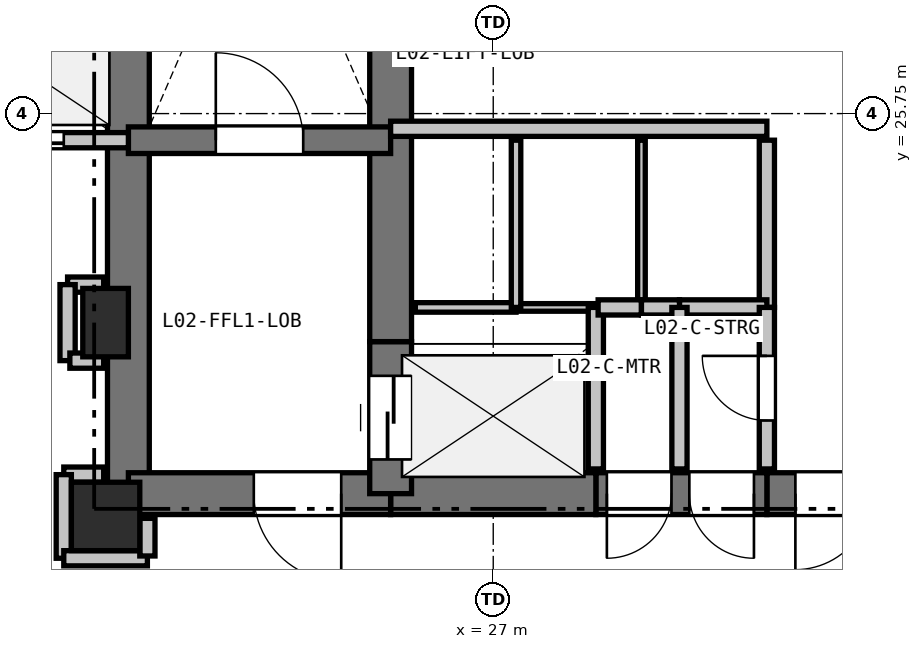
"""IFC4 building model, lengths in metres.
Left out: names, types, materials, properties, quantities, classifications, styles, units other than length and angle.
Written with IfcOpenShell. Run it as: python <this file> out.ifc"""

import sys

from ifc_helpers import new_model, si_unit, direction, frame, frame_2d, origin, origin_2d, place, context, subcontext, project, spatial, rectangle, extrude, element, fill, save


model = new_model("IFC4")
c1 = context("Model", 3, precision=1e-05, world=origin(), true_north=direction((0.0, 1.0)))
c2 = subcontext(c1, "Body", "Model", "MODEL_VIEW")
j1 = project(units=[si_unit("LENGTHUNIT", "METRE"), si_unit("PLANEANGLEUNIT", "RADIAN")], contexts=[c1])
p1 = place(None, origin())
s1 = spatial("IfcSite", under=j1, at=p1, CompositionType="ELEMENT")
p2 = place(p1, origin())
s2 = spatial("IfcBuilding", under=s1, at=p2, CompositionType="ELEMENT")
p3 = place(p2, frame((0.0, 0.0, 9.6)))
s3 = spatial("IfcBuildingStorey", under=s2, at=p3, CompositionType="ELEMENT", Elevation=9.6)
p4 = place(p3, frame((21.9, 20.45, 0.0), z_axis=(0.0, 0.0, 1.0), x_axis=(1.0, 0.0, 0.0)))
e1 = element("IfcColumn", 1, at=p4, inside=s3, PredefinedType="COLUMN", context=c2, shape_type="SweptSolid", body=[
    extrude(rectangle(XDim=0.9, YDim=0.9, at=origin_2d()), origin(), (0.0, 0.0, 1.0), 4.8),
])
p5 = place(p3, frame((21.9, 23.0, 0.0), z_axis=(0.0, 0.0, 1.0), x_axis=(1.0, 0.0, 0.0)))
e2 = element("IfcColumn", 2, at=p5, inside=s3, PredefinedType="PILASTER", context=c2, shape_type="SweptSolid", body=[
    extrude(rectangle(XDim=0.6, YDim=0.9, at=origin_2d()), origin(), (0.0, 0.0, 1.0), 4.8),
])
p6 = place(p3, frame((22.2, 20.75, 0.0), z_axis=(0.0, 0.0, 1.0), x_axis=(0.0, 1.0, 0.0)))
e3 = element("IfcWall", 3, at=p6, inside=s3, PredefinedType="SHEAR", context=c2, shape_type="SweptSolid", body=[
    extrude(rectangle(XDim=4.65, YDim=0.55, at=frame_2d((2.325, 0.0))), origin(), (0.0, 0.0, 1.0), 4.48),
])
p7 = place(p3, frame((22.2, 25.4, 0.0), z_axis=(0.0, 0.0, 1.0), x_axis=(0.0, 1.0, 0.0)))
e4 = element("IfcWall", 4, at=p7, inside=s3, PredefinedType="SHEAR", context=c2, shape_type="SweptSolid", body=[
    extrude(rectangle(XDim=7.35, YDim=0.55, at=frame_2d((3.675, 0.0))), origin(), (0.0, 0.0, 1.0), 4.48),
])
p8 = place(p3, frame((32.35, 20.75, 0.0), z_axis=(0.0, 0.0, 1.0), x_axis=(-1.0, 0.0, 0.0)))
e5 = element("IfcWall", 5, at=p8, inside=s3, PredefinedType="SHEAR", context=c2, shape_type="SweptSolid", body=[
    extrude(rectangle(XDim=1.75, YDim=0.55, at=frame_2d((0.875, 0.0))), origin(), (0.0, 0.0, 1.0), 4.48),
])
p9 = place(p8, frame((0.375, 0.0, 0.0)))
e6 = element("IfcOpeningElement", 6, at=p9, cuts=e5, PredefinedType="OPENING", context=c2, shape_type="SweptSolid", body=[
    extrude(rectangle(XDim=1.0, YDim=2.15, at=frame_2d((0.5, 1.075))), frame((0.0, 0.285, 0.0), z_axis=(0.0, -1.0, 0.0), x_axis=(1.0, 0.0, 0.0)), (0.0, 0.0, 1.0), 0.57),
])
p10 = place(p3, frame((30.6, 20.75, 0.0), z_axis=(0.0, 0.0, 1.0), x_axis=(-1.0, 0.0, 0.0)))
e7 = element("IfcWall", 7, at=p10, inside=s3, PredefinedType="SHEAR", context=c2, shape_type="SweptSolid", body=[
    extrude(rectangle(XDim=2.25, YDim=0.55, at=frame_2d((1.125, 0.0))), origin(), (0.0, 0.0, 1.0), 4.48),
])
p11 = place(p10, frame((1.255, 0.0, 0.0)))
e8 = element("IfcOpeningElement", 8, at=p11, cuts=e7, PredefinedType="OPENING", context=c2, shape_type="SweptSolid", body=[
    extrude(rectangle(XDim=0.85, YDim=2.1, at=frame_2d((0.425, 1.05))), frame((0.0, 0.285, 0.0), z_axis=(0.0, -1.0, 0.0), x_axis=(1.0, 0.0, 0.0)), (0.0, 0.0, 1.0), 0.57),
])
p12 = place(p10, frame((0.17, 0.0, 0.0)))
e9 = element("IfcOpeningElement", 9, at=p12, cuts=e7, PredefinedType="OPENING", context=c2, shape_type="SweptSolid", body=[
    extrude(rectangle(XDim=0.85, YDim=2.1, at=frame_2d((0.425, 1.05))), frame((0.0, 0.285, 0.0), z_axis=(0.0, -1.0, 0.0), x_axis=(1.0, 0.0, 0.0)), (0.0, 0.0, 1.0), 0.57),
])
p13 = place(p3, frame((28.35, 20.75, 0.0), z_axis=(0.0, 0.0, 1.0), x_axis=(-1.0, 0.0, 0.0)))
e10 = element("IfcWall", 10, at=p13, inside=s3, PredefinedType="SHEAR", context=c2, shape_type="SweptSolid", body=[
    extrude(rectangle(XDim=2.7, YDim=0.55, at=frame_2d((1.35, 0.0))), origin(), (0.0, 0.0, 1.0), 4.48),
])
p14 = place(p3, frame((25.65, 20.75, 0.0), z_axis=(0.0, 0.0, 1.0), x_axis=(-1.0, 0.0, 0.0)))
e11 = element("IfcWall", 11, at=p14, inside=s3, PredefinedType="SHEAR", context=c2, shape_type="SweptSolid", body=[
    extrude(rectangle(XDim=3.45, YDim=0.55, at=frame_2d((1.725, 0.0))), origin(), (0.0, 0.0, 1.0), 4.48),
])
p15 = place(p14, frame((0.65, 0.0, 0.0)))
e12 = element("IfcOpeningElement", 12, at=p15, cuts=e11, PredefinedType="OPENING", context=c2, shape_type="SweptSolid", body=[
    extrude(rectangle(XDim=1.15, YDim=2.15, at=frame_2d((0.575, 1.075))), frame((0.0, 0.285, 0.0), z_axis=(0.0, -1.0, 0.0), x_axis=(1.0, 0.0, 0.0)), (0.0, 0.0, 1.0), 0.57),
])
p16 = place(p3, frame((25.65, 20.75, 0.0), z_axis=(0.0, 0.0, 1.0), x_axis=(0.0, 1.0, 0.0)))
e13 = element("IfcWall", 13, at=p16, inside=s3, PredefinedType="SHEAR", context=c2, shape_type="SweptSolid", body=[
    extrude(rectangle(XDim=2.0, YDim=0.55, at=frame_2d((1.0, 0.0))), origin(), (0.0, 0.0, 1.0), 4.48),
])
p17 = place(p16, frame((0.45, 0.0, 0.0)))
e14 = element("IfcOpeningElement", 14, at=p17, cuts=e13, PredefinedType="OPENING", context=c2, shape_type="SweptSolid", body=[
    extrude(rectangle(XDim=1.1, YDim=2.15, at=frame_2d((0.55, 1.075))), frame((0.0, 0.285, 0.0), z_axis=(0.0, -1.0, 0.0), x_axis=(1.0, 0.0, 0.0)), (0.0, 0.0, 1.0), 0.57),
])
p18 = place(p3, frame((25.65, 22.75, 0.0), z_axis=(0.0, 0.0, 1.0), x_axis=(0.0, 1.0, 0.0)))
e15 = element("IfcWall", 15, at=p18, inside=s3, PredefinedType="SHEAR", context=c2, shape_type="SweptSolid", body=[
    extrude(rectangle(XDim=2.8, YDim=0.55, at=frame_2d((1.4, 0.0))), origin(), (0.0, 0.0, 1.0), 4.48),
])
p19 = place(p3, frame((25.65, 25.55, 0.0), z_axis=(0.0, 0.0, 1.0), x_axis=(0.0, 1.0, 0.0)))
e16 = element("IfcWall", 16, at=p19, inside=s3, PredefinedType="SHEAR", context=c2, shape_type="SweptSolid", body=[
    extrude(rectangle(XDim=2.4, YDim=0.55, at=frame_2d((1.2, 0.0))), origin(), (0.0, 0.0, 1.0), 4.48),
])
p20 = place(p3, frame((22.2, 25.4, 0.0), z_axis=(0.0, 0.0, 1.0), x_axis=(1.0, 0.0, 0.0)))
e17 = element("IfcWall", 17, at=p20, inside=s3, PredefinedType="SHEAR", context=c2, shape_type="SweptSolid", body=[
    extrude(rectangle(XDim=3.45, YDim=0.35, at=frame_2d((1.725, 0.0))), origin(), (0.0, 0.0, 1.0), 4.48),
])
p21 = place(p20, frame((1.15, 0.0, 0.0)))
e18 = element("IfcOpeningElement", 18, at=p21, cuts=e17, PredefinedType="OPENING", context=c2, shape_type="SweptSolid", body=[
    extrude(rectangle(XDim=1.15, YDim=2.15, at=frame_2d((0.575, 1.075))), frame((0.0, 0.185, 0.0), z_axis=(0.0, -1.0, 0.0), x_axis=(1.0, 0.0, 0.0)), (0.0, 0.0, 1.0), 0.37),
])
p22 = place(p3, frame((25.65, 25.55, 0.0), z_axis=(0.0, 0.0, 1.0), x_axis=(1.0, 0.0, 0.0)))
e19 = element("IfcWall", 19, at=p22, inside=s3, PredefinedType="PARTITIONING", context=c2, shape_type="SweptSolid", body=[
    extrude(rectangle(XDim=4.95, YDim=0.2, at=frame_2d((2.475, 0.0))), origin(), (0.0, 0.0, 1.0), 4.48),
])
p23 = place(p3, frame((22.2, 25.4, 0.0), z_axis=(0.0, 0.0, 1.0), x_axis=(-1.0, 0.0, 0.0)))
e20 = element("IfcWall", 20, at=p23, inside=s3, PredefinedType="PARTITIONING", context=c2, shape_type="SweptSolid", body=[
    extrude(rectangle(XDim=2.8, YDim=0.2, at=frame_2d((1.4, 0.0))), origin(), (0.0, 0.0, 1.0), 3.928),
])
p24 = place(p23, frame((0.85, 0.0, 0.0)))
e21 = element("IfcOpeningElement", 21, at=p24, cuts=e20, PredefinedType="OPENING", context=c2, shape_type="SweptSolid", body=[
    extrude(rectangle(XDim=1.3, YDim=2.2, at=frame_2d((0.65, 1.1))), frame((0.0, 0.11, 0.0), z_axis=(0.0, -1.0, 0.0), x_axis=(1.0, 0.0, 0.0)), (0.0, 0.0, 1.0), 0.22),
])
p25 = place(p3, frame((25.975, 23.2, 0.0), z_axis=(0.0, 0.0, 1.0), x_axis=(1.0, 0.0, 0.0)))
e22 = element("IfcWall", 22, at=p25, inside=s3, PredefinedType="PARTITIONING", context=c2, shape_type="SweptSolid", body=[
    extrude(rectangle(XDim=1.325, YDim=0.125, at=frame_2d((0.663, 0.0))), origin(), (0.0, 0.0, 1.0), 4.48),
])
p26 = place(p3, frame((27.3, 23.2, 0.0), z_axis=(0.0, 0.0, 1.0), x_axis=(1.0, 0.0, 0.0)))
e23 = element("IfcWall", 23, at=p26, inside=s3, PredefinedType="PARTITIONING", context=c2, shape_type="SweptSolid", body=[
    extrude(rectangle(XDim=1.05, YDim=0.1, at=frame_2d((0.525, 0.0))), origin(), (0.0, 0.0, 1.0), 4.48),
])
p27 = place(p3, frame((28.35, 23.2, 0.0), z_axis=(0.0, 0.0, 1.0), x_axis=(0.0, -1.0, 0.0)))
e24 = element("IfcWall", 24, at=p27, inside=s3, PredefinedType="PARTITIONING", context=c2, shape_type="SweptSolid", body=[
    extrude(rectangle(XDim=2.125, YDim=0.2, at=frame_2d((1.062, 0.0))), origin(), (0.0, 0.0, 1.0), 4.48),
])
p28 = place(p3, frame((27.3, 25.4, 0.0), z_axis=(0.0, 0.0, 1.0), x_axis=(0.0, -1.0, 0.0)))
e25 = element("IfcWall", 25, at=p28, inside=s3, PredefinedType="PARTITIONING", context=c2, shape_type="SweptSolid", body=[
    extrude(rectangle(XDim=2.2, YDim=0.125, at=frame_2d((1.1, 0.0))), origin(), (0.0, 0.0, 1.0), 4.48),
])
p29 = place(p3, frame((28.95, 25.4, 0.0), z_axis=(0.0, 0.0, 1.0), x_axis=(0.0, -1.0, 0.0)))
e26 = element("IfcWall", 26, at=p29, inside=s3, PredefinedType="PARTITIONING", context=c2, shape_type="SweptSolid", body=[
    extrude(rectangle(XDim=2.2, YDim=0.1, at=frame_2d((1.1, 0.0))), origin(), (0.0, 0.0, 1.0), 4.48),
])
p30 = place(p3, frame((28.95, 23.2, 0.0), z_axis=(0.0, 0.0, 1.0), x_axis=(-1.0, 0.0, 0.0)))
e27 = element("IfcWall", 27, at=p30, inside=s3, PredefinedType="PARTITIONING", context=c2, shape_type="SweptSolid", body=[
    extrude(rectangle(XDim=0.57, YDim=0.2, at=frame_2d((0.285, 0.0))), origin(), (0.0, 0.0, 1.0), 4.48),
])
p31 = place(p3, frame((30.6, 25.4, 0.0), z_axis=(0.0, 0.0, 1.0), x_axis=(0.0, -1.0, 0.0)))
e28 = element("IfcWall", 28, at=p31, inside=s3, PredefinedType="PARTITIONING", context=c2, shape_type="SweptSolid", body=[
    extrude(rectangle(XDim=2.2, YDim=0.2, at=frame_2d((1.1, 0.0))), origin(), (0.0, 0.0, 1.0), 4.48),
])
p32 = place(p3, frame((30.6, 23.2, 0.0), z_axis=(0.0, 0.0, 1.0), x_axis=(-1.0, 0.0, 0.0)))
e29 = element("IfcWall", 29, at=p32, inside=s3, PredefinedType="PARTITIONING", context=c2, shape_type="SweptSolid", body=[
    extrude(rectangle(XDim=1.15, YDim=0.2, at=frame_2d((0.575, 0.0))), origin(), (0.0, 0.0, 1.0), 4.48),
])
p33 = place(p3, frame((29.45, 23.2, 0.0), z_axis=(0.0, 0.0, 1.0), x_axis=(-1.0, 0.0, 0.0)))
e30 = element("IfcWall", 30, at=p33, inside=s3, PredefinedType="PARTITIONING", context=c2, shape_type="SweptSolid", body=[
    extrude(rectangle(XDim=0.5, YDim=0.2, at=frame_2d((0.25, 0.0))), origin(), (0.0, 0.0, 1.0), 4.48),
])
p34 = place(p3, frame((30.6, 21.075, 0.0), z_axis=(0.0, 0.0, 1.0), x_axis=(0.0, 1.0, 0.0)))
e31 = element("IfcWall", 31, at=p34, inside=s3, PredefinedType="PARTITIONING", context=c2, shape_type="SweptSolid", body=[
    extrude(rectangle(XDim=2.125, YDim=0.2, at=frame_2d((1.062, 0.0))), origin(), (0.0, 0.0, 1.0), 4.48),
])
p35 = place(p34, frame((0.637, 0.0, 0.0)))
e32 = element("IfcOpeningElement", 32, at=p35, cuts=e31, PredefinedType="OPENING", context=c2, shape_type="SweptSolid", body=[
    extrude(rectangle(XDim=0.85, YDim=2.1, at=frame_2d((0.425, 1.05))), frame((0.0, 0.11, 0.0), z_axis=(0.0, -1.0, 0.0), x_axis=(1.0, 0.0, 0.0)), (0.0, 0.0, 1.0), 0.22),
])
p36 = place(p3, frame((21.875, 21.0, 0.0), z_axis=(0.0, 0.0, 1.0), x_axis=(-1.0, 0.0, 0.0)))
e33 = element("IfcWall", 33, at=p36, inside=s3, PredefinedType="PARTITIONING", context=c2, shape_type="SweptSolid", body=[
    extrude(rectangle(XDim=0.525, YDim=0.2, at=frame_2d((0.262, 0.0))), origin(), (0.0, 0.0, 1.0), 3.928),
])
p37 = place(p3, frame((21.35, 21.0, 0.0), z_axis=(0.0, 0.0, 1.0), x_axis=(0.0, -1.0, 0.0)))
e34 = element("IfcWall", 34, at=p37, inside=s3, PredefinedType="PARTITIONING", context=c2, shape_type="SweptSolid", body=[
    extrude(rectangle(XDim=1.1, YDim=0.2, at=frame_2d((0.55, 0.0))), origin(), (0.0, 0.0, 1.0), 3.777),
])
p38 = place(p3, frame((21.35, 19.9, 0.0), z_axis=(0.0, 0.0, 1.0), x_axis=(1.0, 0.0, 0.0)))
e35 = element("IfcWall", 35, at=p38, inside=s3, PredefinedType="PARTITIONING", context=c2, shape_type="SweptSolid", body=[
    extrude(rectangle(XDim=1.1, YDim=0.2, at=frame_2d((0.55, 0.0))), origin(), (0.0, 0.0, 1.0), 3.777),
])
p39 = place(p3, frame((22.45, 19.93, 0.0), z_axis=(0.0, 0.0, 1.0), x_axis=(0.0, 1.0, 0.0)))
e36 = element("IfcWall", 36, at=p39, inside=s3, PredefinedType="PARTITIONING", context=c2, shape_type="SweptSolid", body=[
    extrude(rectangle(XDim=0.495, YDim=0.2, at=frame_2d((0.248, 0.0))), origin(), (0.0, 0.0, 1.0), 3.777),
])
p40 = place(p3, frame((21.875, 23.5, 0.0), z_axis=(0.0, 0.0, 1.0), x_axis=(-1.0, 0.0, 0.0)))
e37 = element("IfcWall", 37, at=p40, inside=s3, PredefinedType="PARTITIONING", context=c2, shape_type="SweptSolid", body=[
    extrude(rectangle(XDim=0.475, YDim=0.2, at=frame_2d((0.238, 0.0))), origin(), (0.0, 0.0, 1.0), 3.928),
])
p41 = place(p3, frame((21.4, 23.5, 0.0), z_axis=(0.0, 0.0, 1.0), x_axis=(0.0, -1.0, 0.0)))
e38 = element("IfcWall", 38, at=p41, inside=s3, PredefinedType="PARTITIONING", context=c2, shape_type="SweptSolid", body=[
    extrude(rectangle(XDim=1.0, YDim=0.2, at=frame_2d((0.5, 0.0))), origin(), (0.0, 0.0, 1.0), 4.48),
])
p42 = place(p3, frame((21.43, 22.5, 0.0), z_axis=(0.0, 0.0, 1.0), x_axis=(1.0, 0.0, 0.0)))
e39 = element("IfcWall", 39, at=p42, inside=s3, PredefinedType="PARTITIONING", context=c2, shape_type="SweptSolid", body=[
    extrude(rectangle(XDim=0.445, YDim=0.2, at=frame_2d((0.223, 0.0))), origin(), (0.0, 0.0, 1.0), 3.928),
])
p43 = place(p3, frame((29.45, 23.2, 0.0), z_axis=(0.0, 0.0, 1.0), x_axis=(0.0, -1.0, 0.0)))
e40 = element("IfcWall", 40, at=p43, inside=s3, PredefinedType="PARTITIONING", context=c2, shape_type="SweptSolid", body=[
    extrude(rectangle(XDim=2.125, YDim=0.2, at=frame_2d((1.062, 0.0))), origin(), (0.0, 0.0, 1.0), 4.48),
])
p44 = place(p9, origin())
e41 = element("IfcDoor", 41, at=p44, inside=s3, OperationType="SINGLE_SWING_RIGHT", PredefinedType="DOOR", context=c2, shape_type="SweptSolid", body=[
    extrude(rectangle(XDim=1.0, YDim=2.15, at=frame_2d((0.5, 1.075))), frame((0.0, 0.025, 0.0), z_axis=(0.0, -1.0, 0.0), x_axis=(1.0, 0.0, 0.0)), (0.0, 0.0, 1.0), 0.05),
])
fill(e6, e41)
p45 = place(p17, origin())
e42 = element("IfcDoor", 42, at=p45, inside=s3, OperationType="SLIDING_TO_LEFT", PredefinedType="DOOR", context=c2, shape_type="SweptSolid", body=[
    extrude(rectangle(XDim=1.1, YDim=2.15, at=frame_2d((0.55, 1.075))), frame((0.0, 0.025, 0.0), z_axis=(0.0, -1.0, 0.0), x_axis=(1.0, 0.0, 0.0)), (0.0, 0.0, 1.0), 0.05),
])
fill(e14, e42)
p46 = place(p24, origin())
e43 = element("IfcDoor", 43, at=p46, inside=s3, OperationType="SLIDING_TO_LEFT", PredefinedType="DOOR", context=c2, shape_type="SweptSolid", body=[
    extrude(rectangle(XDim=1.3, YDim=2.2, at=frame_2d((0.65, 1.1))), frame((0.0, 0.025, 0.0), z_axis=(0.0, -1.0, 0.0), x_axis=(1.0, 0.0, 0.0)), (0.0, 0.0, 1.0), 0.05),
])
fill(e21, e43)
p47 = place(p21, origin())
e44 = element("IfcDoor", 44, at=p47, inside=s3, OperationType="SINGLE_SWING_LEFT", PredefinedType="DOOR", context=c2, shape_type="SweptSolid", body=[
    extrude(rectangle(XDim=1.15, YDim=2.15, at=frame_2d((0.575, 1.075))), frame((0.0, 0.025, 0.0), z_axis=(0.0, -1.0, 0.0), x_axis=(1.0, 0.0, 0.0)), (0.0, 0.0, 1.0), 0.05),
])
fill(e18, e44)
p48 = place(p15, origin())
e45 = element("IfcDoor", 45, at=p48, inside=s3, OperationType="SINGLE_SWING_LEFT", PredefinedType="DOOR", context=c2, shape_type="SweptSolid", body=[
    extrude(rectangle(XDim=1.15, YDim=2.15, at=frame_2d((0.575, 1.075))), frame((0.0, 0.025, 0.0), z_axis=(0.0, -1.0, 0.0), x_axis=(1.0, 0.0, 0.0)), (0.0, 0.0, 1.0), 0.05),
])
fill(e12, e45)
p49 = place(p35, origin())
e46 = element("IfcDoor", 46, at=p49, inside=s3, OperationType="SINGLE_SWING_RIGHT", PredefinedType="DOOR", context=c2, shape_type="SweptSolid", body=[
    extrude(rectangle(XDim=0.85, YDim=2.1, at=frame_2d((0.425, 1.05))), frame((0.0, 0.025, 0.0), z_axis=(0.0, -1.0, 0.0), x_axis=(1.0, 0.0, 0.0)), (0.0, 0.0, 1.0), 0.05),
])
fill(e32, e46)
p50 = place(p11, origin())
e47 = element("IfcDoor", 47, at=p50, inside=s3, OperationType="SINGLE_SWING_RIGHT", PredefinedType="DOOR", context=c2, shape_type="SweptSolid", body=[
    extrude(rectangle(XDim=0.85, YDim=2.1, at=frame_2d((0.425, 1.05))), frame((0.0, 0.025, 0.0), z_axis=(0.0, -1.0, 0.0), x_axis=(1.0, 0.0, 0.0)), (0.0, 0.0, 1.0), 0.05),
])
fill(e8, e47)
p51 = place(p12, origin())
e48 = element("IfcDoor", 48, at=p51, inside=s3, OperationType="SINGLE_SWING_LEFT", PredefinedType="DOOR", context=c2, shape_type="SweptSolid", body=[
    extrude(rectangle(XDim=0.85, YDim=2.1, at=frame_2d((0.425, 1.05))), frame((0.0, 0.025, 0.0), z_axis=(0.0, -1.0, 0.0), x_axis=(1.0, 0.0, 0.0)), (0.0, 0.0, 1.0), 0.05),
])
fill(e9, e48)
save(model, sys.argv[1])
